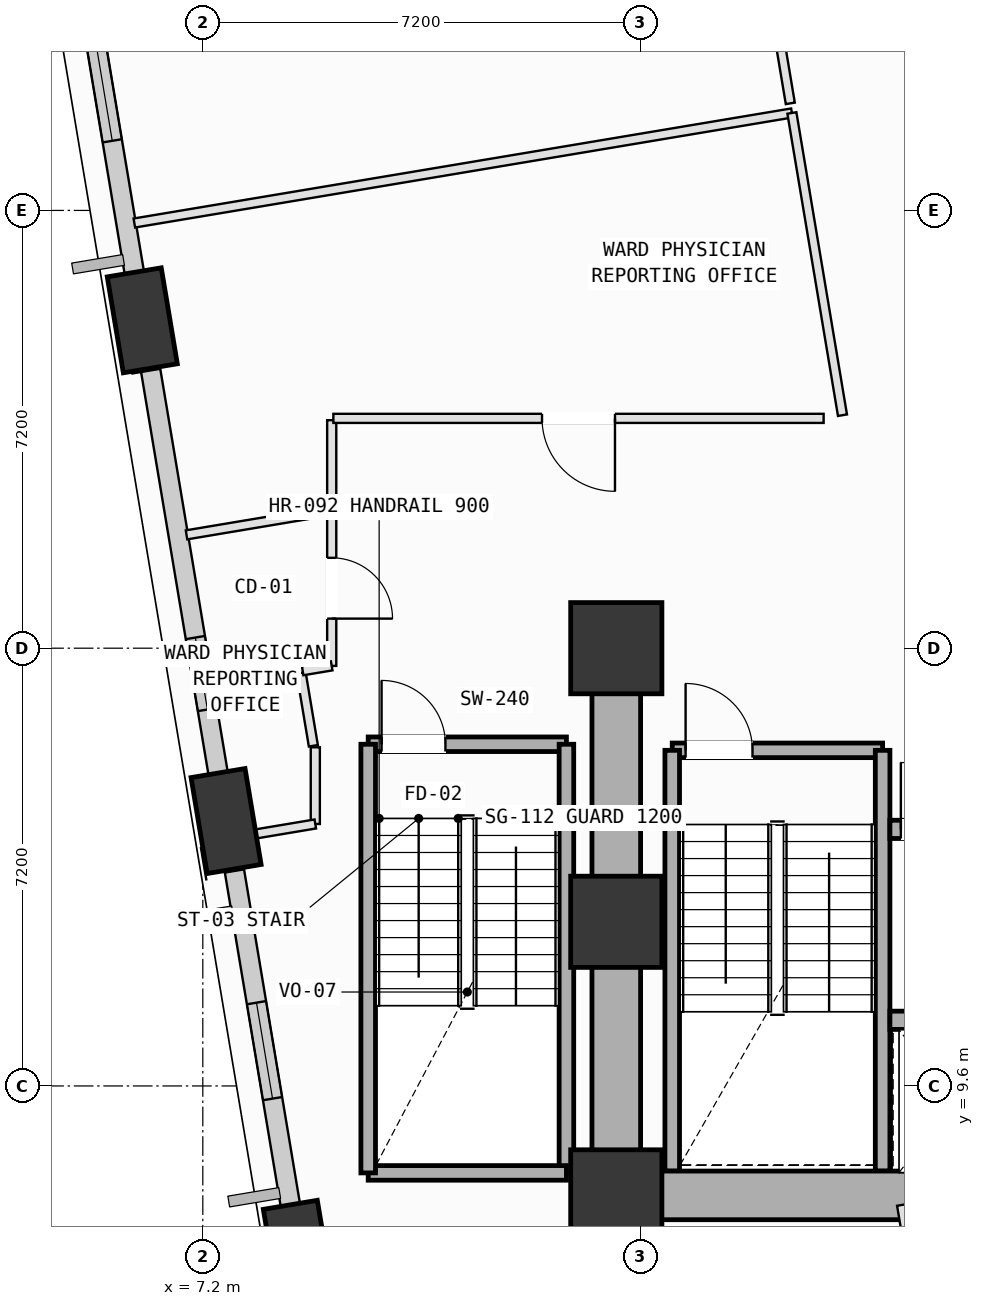
"""IFC4 building model, lengths in metres.
Left out: names, types, materials, properties, quantities, classifications, styles, units other than length and angle.
Written with IfcOpenShell. Run it as: python <this file> out.ifc"""

import sys

from ifc_helpers import new_model, si_unit, direction, frame, frame_2d, origin, origin_2d, place, context, subcontext, project, spatial, rectangle, extrude, element, fill, save


model = new_model("IFC4")
c1 = context("Model", 3, precision=1e-05, world=origin(), true_north=direction((0.0, 1.0)))
c2 = subcontext(c1, "Body", "Model", "MODEL_VIEW")
j1 = project(units=[si_unit("LENGTHUNIT", "METRE"), si_unit("PLANEANGLEUNIT", "RADIAN")], contexts=[c1])
p1 = place(None, origin())
s1 = spatial("IfcSite", under=j1, at=p1, CompositionType="ELEMENT")
p2 = place(p1, origin())
s2 = spatial("IfcBuilding", under=s1, at=p2, CompositionType="ELEMENT")
p3 = place(p2, frame((0.0, 0.0, 63.0)))
s3 = spatial("IfcBuildingStorey", under=s2, at=p3, CompositionType="ELEMENT", Elevation=63.0)
for number, where, z_axis, x_axis in (
    (1, (14.0, 7.8, 0.0), (0.0, 0.0, 1.0), (1.0, 0.0, 0.0)),
    (2, (14.0, 12.3, 0.0), (0.0, 0.0, 1.0), (1.0, 0.0, 0.0)),
    (3, (14.0, 16.8, 0.0), (0.0, 0.0, 1.0), (1.0, 0.0, 0.0)),
):
    element("IfcColumn", number, at=place(p3, frame(where, z_axis=z_axis, x_axis=x_axis)), inside=s3, PredefinedType="COLUMN", context=c2, shape_type="SweptSolid", body=[
        extrude(rectangle(XDim=1.5, YDim=1.5, at=origin_2d()), origin(), (0.0, 0.0, 1.0), 4.0),
    ])
p4 = place(p3, frame((6.205, 22.192, 0.002), z_axis=(0.011713921477, -0.112708560528, 0.993559039226), x_axis=(-0.265463218186, 0.957621337914, 0.111761589836)))
e4 = element("IfcColumn", 4, at=p4, inside=s3, PredefinedType="COLUMN", context=c2, shape_type="SweptSolid", body=[
    extrude(rectangle(XDim=1.6, YDim=0.9, at=origin_2d()), origin(), (0.0, 0.0, 1.0), 4.022),
])
p5 = place(p3, frame((7.583, 13.957, 0.002), z_axis=(0.045566648584, -0.106726677575, 0.993243724788), x_axis=(-0.536447132256, 0.836136603169, 0.114455472285)))
e5 = element("IfcColumn", 5, at=p5, inside=s3, PredefinedType="COLUMN", context=c2, shape_type="SweptSolid", body=[
    extrude(rectangle(XDim=1.6, YDim=0.9, at=origin_2d()), origin(), (0.0, 0.0, 1.0), 4.024),
])
p6 = place(p3, frame((8.771, 6.856, 0.002), z_axis=(0.074599959004, -0.101446248068, 0.99204007221), x_axis=(-0.712617722473, 0.690471888426, 0.124195623555)))
e6 = element("IfcColumn", 6, at=p6, inside=s3, PredefinedType="COLUMN", context=c2, shape_type="SweptSolid", body=[
    extrude(rectangle(XDim=1.6, YDim=0.9, at=origin_2d()), origin(), (0.0, 0.0, 1.0), 4.029),
])
p7 = place(p3, frame((6.142, 22.567, 0.0), z_axis=(0.0, 0.0, 1.0), x_axis=(-0.165032330443, 0.986288157644, 0.0)))
e7 = element("IfcWall", 7, at=p7, inside=s3, PredefinedType="SOLIDWALL", context=c2, shape_type="SweptSolid", body=[
    extrude(rectangle(XDim=5.438, YDim=0.32, at=frame_2d((2.719, 0.0))), origin(), (0.0, 0.0, 1.0), 3.165),
])
p8 = place(p7, frame((2.613, 0.0, 0.75)))
e8 = element("IfcOpeningElement", 8, at=p8, cuts=e7, PredefinedType="OPENING", context=c2, shape_type="SweptSolid", body=[
    extrude(rectangle(XDim=1.8, YDim=2.05, at=frame_2d((0.9, 1.025))), frame((0.0, 0.17, 0.0), z_axis=(0.0, -1.0, 0.0), x_axis=(1.0, 0.0, 0.0)), (0.0, 0.0, 1.0), 0.34),
])
p9 = place(p3, frame((7.52, 14.33, 0.0), z_axis=(0.0, 0.0, 1.0), x_axis=(-0.165031385205, 0.986288315807, 0.0)))
e9 = element("IfcWall", 9, at=p9, inside=s3, PredefinedType="SOLIDWALL", context=c2, shape_type="SweptSolid", body=[
    extrude(rectangle(XDim=7.136, YDim=0.32, at=frame_2d((3.568, 0.0))), origin(), (0.0, 0.0, 1.0), 3.165),
])
p10 = place(p9, frame((1.481, 0.0, 0.75)))
e10 = element("IfcOpeningElement", 10, at=p10, cuts=e9, PredefinedType="OPENING", context=c2, shape_type="SweptSolid", body=[
    extrude(rectangle(XDim=1.2, YDim=1.75, at=frame_2d((0.6, 0.875))), frame((0.0, 0.17, 0.0), z_axis=(0.0, -1.0, 0.0), x_axis=(1.0, 0.0, 0.0)), (0.0, 0.0, 1.0), 0.34),
])
p11 = place(p3, frame((8.71, 7.221, 0.0), z_axis=(0.0, 0.0, 1.0), x_axis=(-0.165039313738, 0.986286989127, 0.0)))
e11 = element("IfcWall", 11, at=p11, inside=s3, PredefinedType="SOLIDWALL", context=c2, shape_type="SweptSolid", body=[
    extrude(rectangle(XDim=5.997, YDim=0.32, at=frame_2d((2.999, 0.0))), origin(), (0.0, 0.0, 1.0), 3.165),
])
p12 = place(p11, frame((2.2, 0.0, 0.75)))
e12 = element("IfcOpeningElement", 12, at=p12, cuts=e11, PredefinedType="OPENING", context=c2, shape_type="SweptSolid", body=[
    extrude(rectangle(XDim=1.6, YDim=1.95, at=frame_2d((0.8, 0.975))), frame((0.0, 0.17, 0.0), z_axis=(0.0, -1.0, 0.0), x_axis=(1.0, 0.0, 0.0)), (0.0, 0.0, 1.0), 0.34),
])
p13 = place(p3, frame((14.92, 15.12, 0.0), z_axis=(0.0, 0.0, 1.0), x_axis=(1.0, 0.0, 0.0)))
e13 = element("IfcWall", 13, at=p13, inside=s3, PredefinedType="SOLIDWALL", context=c2, shape_type="SweptSolid", body=[
    extrude(rectangle(XDim=3.46, YDim=0.24, at=frame_2d((1.73, 0.0))), origin(), (0.0, 0.0, 1.0), 3.78),
])
p14 = place(p13, frame((0.22, 0.0, 0.0)))
e14 = element("IfcOpeningElement", 14, at=p14, cuts=e13, PredefinedType="OPENING", context=c2, shape_type="SweptSolid", body=[
    extrude(rectangle(XDim=1.1, YDim=2.15, at=frame_2d((0.55, 1.075))), frame((0.0, 0.13, 0.0), z_axis=(0.0, -1.0, 0.0), x_axis=(1.0, 0.0, 0.0)), (0.0, 0.0, 1.0), 0.26),
])
for number, where, z_axis, x_axis in (
    (15, (18.38, 15.12, 0.0), (0.0, 0.0, 1.0), (0.0, -1.0, 0.0)),
    (16, (14.92, 8.2, 0.0), (0.0, 0.0, 1.0), (0.0, 1.0, 0.0)),
):
    element("IfcWall", number, at=place(p3, frame(where, z_axis=z_axis, x_axis=x_axis)), inside=s3, PredefinedType="SOLIDWALL", context=c2, shape_type="SweptSolid", body=[
        extrude(rectangle(XDim=6.92, YDim=0.24, at=frame_2d((3.46, 0.0))), origin(), (0.0, 0.0, 1.0), 3.78),
    ])
p15 = place(p3, frame((9.92, 15.22, 0.0), z_axis=(0.0, 0.0, 1.0), x_axis=(1.0, 0.0, 0.0)))
e17 = element("IfcWall", 17, at=p15, inside=s3, PredefinedType="SOLIDWALL", context=c2, shape_type="SweptSolid", body=[
    extrude(rectangle(XDim=3.26, YDim=0.24, at=frame_2d((1.63, 0.0))), origin(), (0.0, 0.0, 1.0), 3.78),
])
p16 = place(p15, frame((0.22, 0.0, 0.0)))
e18 = element("IfcOpeningElement", 18, at=p16, cuts=e17, PredefinedType="OPENING", context=c2, shape_type="SweptSolid", body=[
    extrude(rectangle(XDim=1.05, YDim=2.15, at=frame_2d((0.525, 1.075))), frame((0.0, 0.13, 0.0), z_axis=(0.0, -1.0, 0.0), x_axis=(1.0, 0.0, 0.0)), (0.0, 0.0, 1.0), 0.26),
])
p17 = place(p3, frame((13.18, 15.22, 0.0), z_axis=(0.0, 0.0, 1.0), x_axis=(0.0, -1.0, 0.0)))
e19 = element("IfcWall", 19, at=p17, inside=s3, PredefinedType="SOLIDWALL", context=c2, shape_type="SweptSolid", body=[
    extrude(rectangle(XDim=7.05, YDim=0.24, at=frame_2d((3.525, 0.0))), origin(), (0.0, 0.0, 1.0), 3.78),
])
p18 = place(p3, frame((13.18, 8.17, 0.0), z_axis=(0.0, 0.0, 1.0), x_axis=(-1.0, 0.0, 0.0)))
e20 = element("IfcWall", 20, at=p18, inside=s3, PredefinedType="SOLIDWALL", context=c2, shape_type="SweptSolid", body=[
    extrude(rectangle(XDim=3.26, YDim=0.24, at=frame_2d((1.63, 0.0))), origin(), (0.0, 0.0, 1.0), 3.78),
])
p19 = place(p3, frame((9.92, 8.17, 0.0), z_axis=(0.0, 0.0, 1.0), x_axis=(0.0, 1.0, 0.0)))
e21 = element("IfcWall", 21, at=p19, inside=s3, PredefinedType="SOLIDWALL", context=c2, shape_type="SweptSolid", body=[
    extrude(rectangle(XDim=7.05, YDim=0.24, at=frame_2d((3.525, 0.0))), origin(), (0.0, 0.0, 1.0), 3.78),
])
p20 = place(p3, frame((14.0, 7.8, 0.0), z_axis=(0.0, 0.0, 1.0), x_axis=(1.0, 0.0, 0.0)))
e22 = element("IfcWall", 22, at=p20, inside=s3, PredefinedType="SHEAR", context=c2, shape_type="SweptSolid", body=[
    extrude(rectangle(XDim=10.8, YDim=0.8, at=frame_2d((5.4, 0.0))), origin(), (0.0, 0.0, 1.0), 3.78),
])
p21 = place(p3, frame((14.0, 16.8, 0.0), z_axis=(0.0, 0.0, 1.0), x_axis=(0.0, -1.0, 0.0)))
e23 = element("IfcWall", 23, at=p21, inside=s3, PredefinedType="SHEAR", context=c2, shape_type="SweptSolid", body=[
    extrude(rectangle(XDim=9.0, YDim=0.8, at=frame_2d((4.5, 0.0))), origin(), (0.0, 0.0, 1.0), 3.78),
])
p22 = place(p3, frame((18.5, 10.68, 0.0), z_axis=(0.0, 0.0, 1.0), x_axis=(1.0, 0.0, 0.0)))
e24 = element("IfcWall", 24, at=p22, inside=s3, PredefinedType="SOLIDWALL", context=c2, shape_type="SweptSolid", body=[
    extrude(rectangle(XDim=5.3, YDim=0.3, at=frame_2d((2.65, 0.0))), origin(), (0.0, 0.0, 1.0), 3.78),
])
p23 = place(p22, frame((4.22, 0.0, 0.0)))
e25 = element("IfcOpeningElement", 25, at=p23, cuts=e24, PredefinedType="OPENING", context=c2, shape_type="SweptSolid", body=[
    extrude(rectangle(XDim=0.86, YDim=2.06, at=frame_2d((0.43, 1.03))), frame((0.0, 0.16, 0.0), z_axis=(0.0, -1.0, 0.0), x_axis=(1.0, 0.0, 0.0)), (0.0, 0.0, 1.0), 0.32),
])
p24 = place(p22, frame((0.425, 0.0, 0.0)))
e26 = element("IfcOpeningElement", 26, at=p24, cuts=e24, PredefinedType="OPENING", context=c2, shape_type="SweptSolid", body=[
    extrude(rectangle(XDim=1.25, YDim=2.18, at=frame_2d((0.625, 1.09))), frame((0.0, 0.16, 0.0), z_axis=(0.0, -1.0, 0.0), x_axis=(1.0, 0.0, 0.0)), (0.0, 0.0, 1.0), 0.32),
])
p25 = place(p22, frame((2.525, 0.0, 0.0)))
e27 = element("IfcOpeningElement", 27, at=p25, cuts=e24, PredefinedType="OPENING", context=c2, shape_type="SweptSolid", body=[
    extrude(rectangle(XDim=1.25, YDim=2.18, at=frame_2d((0.625, 1.09))), frame((0.0, 0.16, 0.0), z_axis=(0.0, -1.0, 0.0), x_axis=(1.0, 0.0, 0.0)), (0.0, 0.0, 1.0), 0.32),
])
p26 = place(p3, frame((18.5, 13.82, 0.0), z_axis=(0.0, 0.0, 1.0), x_axis=(1.0, 0.0, 0.0)))
e28 = element("IfcWall", 28, at=p26, inside=s3, PredefinedType="SOLIDWALL", context=c2, shape_type="SweptSolid", body=[
    extrude(rectangle(XDim=5.3, YDim=0.3, at=frame_2d((2.65, 0.0))), origin(), (0.0, 0.0, 1.0), 3.78),
])
p27 = place(p26, frame((0.18, 0.0, 0.0)))
e29 = element("IfcOpeningElement", 29, at=p27, cuts=e28, PredefinedType="OPENING", context=c2, shape_type="SweptSolid", body=[
    extrude(rectangle(XDim=1.1, YDim=2.15, at=frame_2d((0.55, 1.075))), frame((0.0, 0.16, 0.0), z_axis=(0.0, -1.0, 0.0), x_axis=(1.0, 0.0, 0.0)), (0.0, 0.0, 1.0), 0.32),
])
p28 = place(p3, frame((18.692, 7.642, 0.0), z_axis=(0.0, 0.0, 1.0), x_axis=(0.165126417203, -0.986272409805, 0.0)))
e30 = element("IfcWall", 30, at=p28, inside=s3, PredefinedType="PARTITIONING", context=c2, shape_type="SweptSolid", body=[
    extrude(rectangle(XDim=7.673, YDim=0.15, at=frame_2d((3.837, 0.0))), origin(), (0.0, 0.0, 1.0), 3.78),
])
p29 = place(p3, frame((8.817, 16.394, 0.0), z_axis=(0.0, 0.0, 1.0), x_axis=(0.165473534182, -0.98621423103, 0.0)))
e31 = element("IfcWall", 31, at=p29, inside=s3, PredefinedType="PARTITIONING", context=c2, shape_type="SweptSolid", body=[
    extrude(rectangle(XDim=1.216, YDim=0.15, at=frame_2d((0.608, 0.0))), origin(), (0.0, 0.0, 1.0), 3.78),
])
p30 = place(p3, frame((9.05, 15.17, 0.0), z_axis=(0.0, 0.0, 1.0), x_axis=(0.0, -1.0, 0.0)))
e32 = element("IfcWall", 32, at=p30, inside=s3, PredefinedType="PARTITIONING", context=c2, shape_type="SweptSolid", body=[
    extrude(rectangle(XDim=1.261, YDim=0.15, at=frame_2d((0.63, 0.0))), origin(), (0.0, 0.0, 1.0), 3.78),
])
p31 = place(p3, frame((9.05, 13.909, 0.0), z_axis=(0.0, 0.0, 1.0), x_axis=(-0.986243274851, -0.165300341231, 0.0)))
e33 = element("IfcWall", 33, at=p31, inside=s3, PredefinedType="PARTITIONING", context=c2, shape_type="SweptSolid", body=[
    extrude(rectangle(XDim=1.669, YDim=0.15, at=frame_2d((0.834, 0.0))), origin(), (0.0, 0.0, 1.0), 3.78),
])
p32 = place(p3, frame((7.404, 13.633, 0.0), z_axis=(0.0, 0.0, 1.0), x_axis=(-0.164813797451, 0.986324699158, 0.0)))
e34 = element("IfcWall", 34, at=p32, inside=s3, PredefinedType="PARTITIONING", context=c2, shape_type="SweptSolid", body=[
    extrude(rectangle(XDim=0.668, YDim=0.15, at=frame_2d((0.334, 0.0))), origin(), (0.0, 0.0, 1.0), 3.165),
])
p33 = place(p3, frame((6.932, 18.664, 0.0), z_axis=(0.0, 0.0, 1.0), x_axis=(0.986268287341, 0.165151038097, 0.0)))
e35 = element("IfcWall", 35, at=p33, inside=s3, PredefinedType="PARTITIONING", context=c2, shape_type="SweptSolid", body=[
    extrude(rectangle(XDim=2.421, YDim=0.15, at=frame_2d((1.211, 0.0))), origin(), (0.0, 0.0, 1.0), 3.78),
])
p34 = place(p3, frame((9.32, 19.064, 0.0), z_axis=(0.0, 0.0, 1.0), x_axis=(0.0, -1.0, 0.0)))
e36 = element("IfcWall", 36, at=p34, inside=s3, PredefinedType="PARTITIONING", context=c2, shape_type="SweptSolid", body=[
    extrude(rectangle(XDim=2.555, YDim=0.15, at=frame_2d((1.277, 0.0))), origin(), (0.0, 0.0, 1.0), 3.78),
])
p35 = place(p34, frame((0.778, 0.0, 0.0)))
e37 = element("IfcOpeningElement", 37, at=p35, cuts=e36, PredefinedType="OPENING", context=c2, shape_type="SweptSolid", body=[
    extrude(rectangle(XDim=1.0, YDim=2.12, at=frame_2d((0.5, 1.06))), frame((0.0, 0.085, 0.0), z_axis=(0.0, -1.0, 0.0), x_axis=(1.0, 0.0, 0.0)), (0.0, 0.0, 1.0), 0.17),
])
p36 = place(p3, frame((9.32, 16.509, 0.0), z_axis=(0.0, 0.0, 1.0), x_axis=(-0.986257448723, -0.165215752391, 0.0)))
e38 = element("IfcWall", 38, at=p36, inside=s3, PredefinedType="PARTITIONING", context=c2, shape_type="SweptSolid", body=[
    extrude(rectangle(XDim=0.485, YDim=0.15, at=frame_2d((0.242, 0.0))), origin(), (0.0, 0.0, 1.0), 3.78),
])
p37 = place(p3, frame((9.32, 20.55, 0.0), z_axis=(0.0, 0.0, 1.0), x_axis=(0.0, -1.0, 0.0)))
e39 = element("IfcWall", 39, at=p37, inside=s3, PredefinedType="PARTITIONING", context=c2, shape_type="SweptSolid", body=[
    extrude(rectangle(XDim=1.324, YDim=0.15, at=frame_2d((0.662, 0.0))), origin(), (0.0, 0.0, 1.0), 3.78),
])
p38 = place(p3, frame((6.116, 21.331, 0.0), z_axis=(0.0, 0.0, 1.0), x_axis=(-0.165278205734, 0.986246984639, 0.0)))
e40 = element("IfcWall", 40, at=p38, inside=s3, PredefinedType="PARTITIONING", context=c2, shape_type="SweptSolid", body=[
    extrude(rectangle(XDim=1.216, YDim=0.15, at=frame_2d((0.608, 0.0))), origin(), (0.0, 0.0, 1.0), 3.165),
])
p39 = place(p3, frame((6.074, 23.793, 0.0), z_axis=(0.0, 0.0, 1.0), x_axis=(0.986279342954, 0.165085001324, 0.0)))
e41 = element("IfcWall", 41, at=p39, inside=s3, PredefinedType="PARTITIONING", context=c2, shape_type="SweptSolid", body=[
    extrude(rectangle(XDim=10.964, YDim=0.15, at=frame_2d((5.482, 0.0))), origin(), (0.0, 0.0, 1.0), 3.78),
])
p40 = place(p3, frame((16.888, 25.603, 0.0), z_axis=(0.0, 0.0, 1.0), x_axis=(0.165082339721, -0.986279788454, 0.0)))
e42 = element("IfcWall", 42, at=p40, inside=s3, PredefinedType="PARTITIONING", context=c2, shape_type="SweptSolid", body=[
    extrude(rectangle(XDim=5.04, YDim=0.15, at=frame_2d((2.52, 0.0))), origin(), (0.0, 0.0, 1.0), 3.78),
])
p41 = place(p3, frame((17.41, 20.58, 0.0), z_axis=(0.0, 0.0, 1.0), x_axis=(-1.0, 0.0, 0.0)))
e43 = element("IfcWall", 43, at=p41, inside=s3, PredefinedType="PARTITIONING", context=c2, shape_type="SweptSolid", body=[
    extrude(rectangle(XDim=8.063, YDim=0.15, at=frame_2d((4.031, 0.0))), origin(), (0.0, 0.0, 1.0), 3.78),
])
p42 = place(p41, frame((3.431, 0.0, 0.0)))
e44 = element("IfcOpeningElement", 44, at=p42, cuts=e43, PredefinedType="OPENING", context=c2, shape_type="SweptSolid", body=[
    extrude(rectangle(XDim=1.2, YDim=2.15, at=frame_2d((0.6, 1.075))), frame((0.0, 0.085, 0.0), z_axis=(0.0, -1.0, 0.0), x_axis=(1.0, 0.0, 0.0)), (0.0, 0.0, 1.0), 0.17),
])
p43 = place(p3, frame((16.03, 30.731, 0.0), z_axis=(0.0, 0.0, 1.0), x_axis=(0.165113892935, -0.986274506595, 0.0)))
e45 = element("IfcWall", 45, at=p43, inside=s3, PredefinedType="PARTITIONING", context=c2, shape_type="SweptSolid", body=[
    extrude(rectangle(XDim=5.039, YDim=0.15, at=frame_2d((2.52, 0.0))), origin(), (0.0, 0.0, 1.0), 3.78),
])
p44 = place(p43, frame((1.92, 0.0, 0.0)))
e46 = element("IfcOpeningElement", 46, at=p44, cuts=e45, PredefinedType="OPENING", context=c2, shape_type="SweptSolid", body=[
    extrude(rectangle(XDim=1.2, YDim=2.15, at=frame_2d((0.6, 1.075))), frame((0.0, 0.085, 0.0), z_axis=(0.0, -1.0, 0.0), x_axis=(1.0, 0.0, 0.0)), (0.0, 0.0, 1.0), 0.17),
])
p45 = place(p3, frame((19.912, 24.801, 0.0), z_axis=(0.0, 0.0, 1.0), x_axis=(-0.165036777902, 0.986287413455, 0.0)))
e47 = element("IfcWall", 47, at=p45, inside=s3, PredefinedType="PARTITIONING", context=c2, shape_type="SweptSolid", body=[
    extrude(rectangle(XDim=7.635, YDim=0.15, at=frame_2d((3.817, 0.0))), origin(), (0.0, 0.0, 1.0), 3.78),
])
p46 = place(p45, frame((3.217, 0.0, 0.0)))
e48 = element("IfcOpeningElement", 48, at=p46, cuts=e47, PredefinedType="OPENING", context=c2, shape_type="SweptSolid", body=[
    extrude(rectangle(XDim=1.2, YDim=2.15, at=frame_2d((0.6, 1.075))), frame((0.0, 0.085, 0.0), z_axis=(0.0, -1.0, 0.0), x_axis=(1.0, 0.0, 0.0)), (0.0, 0.0, 1.0), 0.17),
])
p47 = place(p8, origin())
e49 = element("IfcWindow", 49, at=p47, inside=s3, PartitioningType="SINGLE_PANEL", PredefinedType="WINDOW", context=c2, shape_type="SweptSolid", body=[
    extrude(rectangle(XDim=1.8, YDim=2.05, at=frame_2d((0.9, 1.025))), frame((0.0, 0.03, 0.0), z_axis=(0.0, -1.0, 0.0), x_axis=(1.0, 0.0, 0.0)), (0.0, 0.0, 1.0), 0.06),
])
fill(e8, e49)
p48 = place(p10, origin())
e50 = element("IfcWindow", 50, at=p48, inside=s3, PartitioningType="SINGLE_PANEL", PredefinedType="WINDOW", context=c2, shape_type="SweptSolid", body=[
    extrude(rectangle(XDim=1.2, YDim=1.75, at=frame_2d((0.6, 0.875))), frame((0.0, 0.03, 0.0), z_axis=(0.0, -1.0, 0.0), x_axis=(1.0, 0.0, 0.0)), (0.0, 0.0, 1.0), 0.06),
])
fill(e10, e50)
p49 = place(p12, origin())
e51 = element("IfcWindow", 51, at=p49, inside=s3, PartitioningType="SINGLE_PANEL", PredefinedType="WINDOW", context=c2, shape_type="SweptSolid", body=[
    extrude(rectangle(XDim=1.6, YDim=1.95, at=frame_2d((0.8, 0.975))), frame((0.0, 0.03, 0.0), z_axis=(0.0, -1.0, 0.0), x_axis=(1.0, 0.0, 0.0)), (0.0, 0.0, 1.0), 0.06),
])
fill(e12, e51)
p50 = place(p14, origin())
e52 = element("IfcDoor", 52, at=p50, inside=s3, OperationType="SINGLE_SWING_LEFT", PredefinedType="DOOR", context=c2, shape_type="SweptSolid", body=[
    extrude(rectangle(XDim=1.1, YDim=2.15, at=frame_2d((0.55, 1.075))), frame((0.0, 0.025, 0.0), z_axis=(0.0, -1.0, 0.0), x_axis=(1.0, 0.0, 0.0)), (0.0, 0.0, 1.0), 0.05),
])
fill(e14, e52)
p51 = place(p16, origin())
e53 = element("IfcDoor", 53, at=p51, inside=s3, OperationType="SINGLE_SWING_LEFT", PredefinedType="DOOR", context=c2, shape_type="SweptSolid", body=[
    extrude(rectangle(XDim=1.05, YDim=2.15, at=frame_2d((0.525, 1.075))), frame((0.0, 0.025, 0.0), z_axis=(0.0, -1.0, 0.0), x_axis=(1.0, 0.0, 0.0)), (0.0, 0.0, 1.0), 0.05),
])
fill(e18, e53)
p52 = place(p27, origin())
e54 = element("IfcDoor", 54, at=p52, inside=s3, OperationType="SINGLE_SWING_LEFT", PredefinedType="DOOR", context=c2, shape_type="SweptSolid", body=[
    extrude(rectangle(XDim=1.1, YDim=2.15, at=frame_2d((0.55, 1.075))), frame((0.0, 0.025, 0.0), z_axis=(0.0, -1.0, 0.0), x_axis=(1.0, 0.0, 0.0)), (0.0, 0.0, 1.0), 0.05),
])
fill(e29, e54)
p53 = place(p35, origin())
e55 = element("IfcDoor", 55, at=p53, inside=s3, OperationType="SINGLE_SWING_RIGHT", PredefinedType="DOOR", context=c2, shape_type="SweptSolid", body=[
    extrude(rectangle(XDim=1.0, YDim=2.12, at=frame_2d((0.5, 1.06))), frame((0.0, 0.025, 0.0), z_axis=(0.0, -1.0, 0.0), x_axis=(1.0, 0.0, 0.0)), (0.0, 0.0, 1.0), 0.05),
])
fill(e37, e55)
p54 = place(p42, origin())
e56 = element("IfcDoor", 56, at=p54, inside=s3, OperationType="SINGLE_SWING_LEFT", PredefinedType="DOOR", context=c2, shape_type="SweptSolid", body=[
    extrude(rectangle(XDim=1.2, YDim=2.15, at=frame_2d((0.6, 1.075))), frame((0.0, 0.025, 0.0), z_axis=(0.0, -1.0, 0.0), x_axis=(1.0, 0.0, 0.0)), (0.0, 0.0, 1.0), 0.05),
])
fill(e44, e56)
save(model, sys.argv[1])
